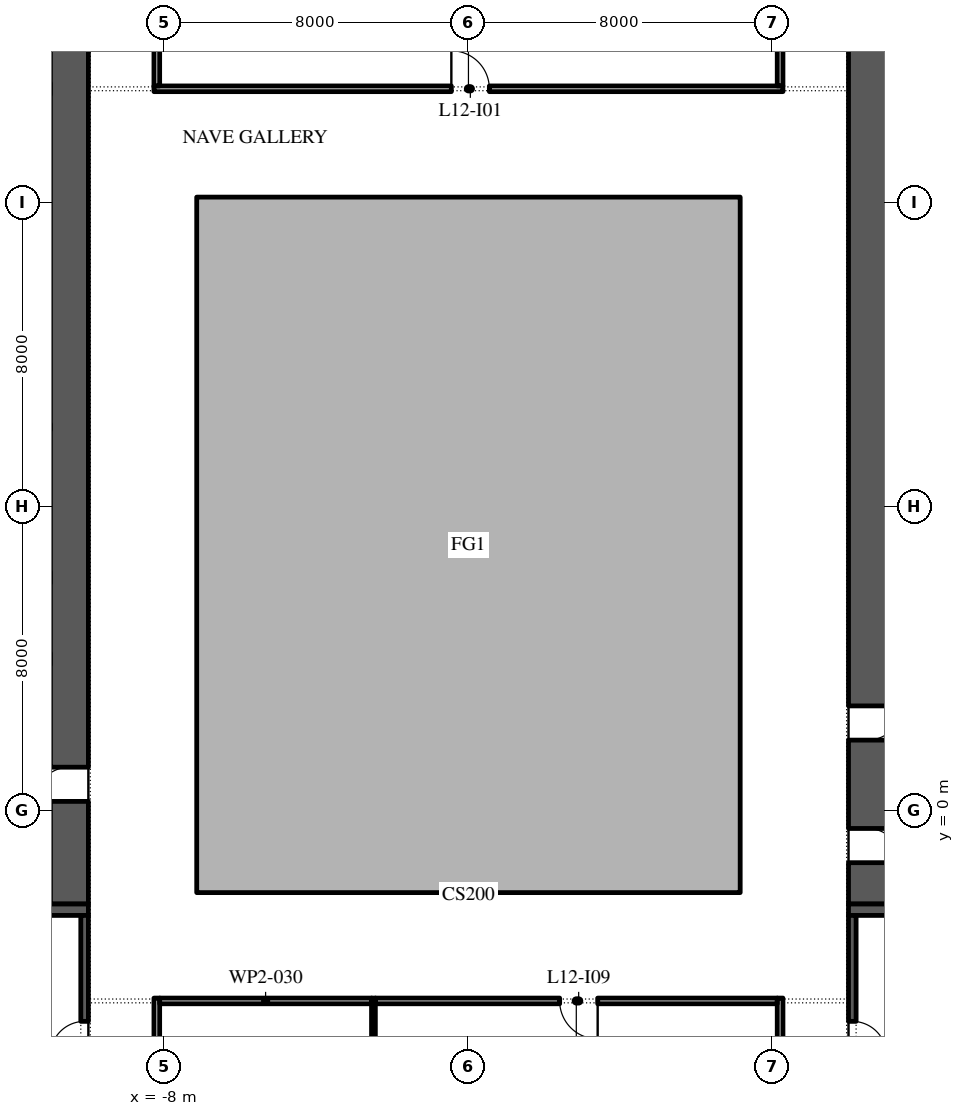
"""IFC4 building model, lengths in metres.
Left out: names, types, materials, properties, quantities, classifications, styles, units other than length and angle.
Written with IfcOpenShell. Run it as: python <this file> out.ifc"""

import sys

from ifc_helpers import new_model, si_unit, direction, frame, frame_2d, origin, place, context, subcontext, project, spatial, polyline, rectangle, outline, extrude, element, fill, save


model = new_model("IFC4")
c1 = context("Model", 3, precision=1e-05, world=origin(), true_north=direction((0.0, 1.0)))
c2 = subcontext(c1, "Body", "Model", "MODEL_VIEW")
j1 = project(units=[si_unit("LENGTHUNIT", "METRE"), si_unit("PLANEANGLEUNIT", "RADIAN")], contexts=[c1])
p1 = place(None, origin())
s1 = spatial("IfcSite", under=j1, at=p1, CompositionType="ELEMENT")
p2 = place(p1, origin())
s2 = spatial("IfcBuilding", under=s1, at=p2, CompositionType="ELEMENT")
p3 = place(p2, frame((0.0, 0.0, 60.6)))
s3 = spatial("IfcBuildingStorey", under=s2, at=p3, CompositionType="ELEMENT", Elevation=60.6)
p4 = place(p3, origin())
e1 = element("IfcWall", 1, at=p4, inside=s3, PredefinedType="STANDARD", context=c2, shape_type="SweptSolid", body=[
    extrude(outline(polyline([(-7.15, -2.15), (7.15, -2.15), (7.15, 16.15), (-7.15, 16.15), (-7.15, -2.15)]), holes=[polyline([(-7.0, -2.0), (-7.0, 16.0), (7.0, 16.0), (7.0, -2.0), (-7.0, -2.0)])]), origin(), (0.0, 0.0, 1.0), 4.0),
])
p5 = place(p3, frame((-10.5, -2.45, 0.0), z_axis=(0.0, 0.0, 1.0), x_axis=(0.0, 1.0, 0.0)))
e2 = element("IfcWall", 2, at=p5, inside=s3, PredefinedType="SHEAR", context=c2, shape_type="SweptSolid", body=[
    extrude(rectangle(XDim=27.9, YDim=1.0, at=frame_2d((13.95, 0.0))), origin(), (0.0, 0.0, 1.0), 4.0),
])
p6 = place(p5, frame((23.65, 0.0, 0.0)))
e3 = element("IfcOpeningElement", 3, at=p6, cuts=e2, PredefinedType="OPENING", context=c2, shape_type="SweptSolid", body=[
    extrude(rectangle(XDim=2.4, YDim=2.1, at=frame_2d((1.2, 1.05))), frame((0.0, 0.51, 0.0), z_axis=(0.0, -1.0, 0.0), x_axis=(1.0, 0.0, 0.0)), (0.0, 0.0, 1.0), 1.02),
])
p7 = place(p5, frame((2.7, 0.0, 0.0)))
e4 = element("IfcOpeningElement", 4, at=p7, cuts=e2, PredefinedType="OPENING", context=c2, shape_type="SweptSolid", body=[
    extrude(rectangle(XDim=0.9, YDim=2.1, at=frame_2d((0.45, 1.05))), frame((0.0, 0.51, 0.0), z_axis=(0.0, -1.0, 0.0), x_axis=(1.0, 0.0, 0.0)), (0.0, 0.0, 1.0), 1.02),
])
p8 = place(p3, frame((-22.0, -2.6, 0.0), z_axis=(0.0, 0.0, 1.0), x_axis=(1.0, 0.0, 0.0)))
e5 = element("IfcWall", 5, at=p8, inside=s3, PredefinedType="SHEAR", context=c2, shape_type="SweptSolid", body=[
    extrude(rectangle(XDim=12.0, YDim=0.3, at=frame_2d((6.0, 0.0))), origin(), (0.0, 0.0, 1.0), 4.0),
])
p9 = place(p3, frame((-10.1, -15.8, 0.0), z_axis=(0.0, 0.0, 1.0), x_axis=(0.0, 1.0, 0.0)))
e6 = element("IfcWall", 6, at=p9, inside=s3, PredefinedType="SHEAR", context=c2, shape_type="SweptSolid", body=[
    extrude(rectangle(XDim=13.05, YDim=0.2, at=frame_2d((6.525, 0.0))), origin(), (0.0, 0.0, 1.0), 4.0),
])
p10 = place(p9, frame((1.175, 0.0, 0.0)))
e7 = element("IfcOpeningElement", 7, at=p10, cuts=e6, PredefinedType="OPENING", context=c2, shape_type="SweptSolid", body=[
    extrude(rectangle(XDim=0.9, YDim=2.1, at=frame_2d((0.45, 1.05))), frame((0.0, 0.11, 0.0), z_axis=(0.0, -1.0, 0.0), x_axis=(1.0, 0.0, 0.0)), (0.0, 0.0, 1.0), 0.22),
])
p11 = place(p9, frame((4.413, 0.0, 0.0)))
e8 = element("IfcOpeningElement", 8, at=p11, cuts=e6, PredefinedType="OPENING", context=c2, shape_type="SweptSolid", body=[
    extrude(rectangle(XDim=1.0, YDim=2.1, at=frame_2d((0.5, 1.05))), frame((0.0, 0.11, 0.0), z_axis=(0.0, -1.0, 0.0), x_axis=(1.0, 0.0, 0.0)), (0.0, 0.0, 1.0), 0.22),
])
p12 = place(p9, frame((9.363, 0.0, 0.0)))
e9 = element("IfcOpeningElement", 9, at=p12, cuts=e6, PredefinedType="OPENING", context=c2, shape_type="SweptSolid", body=[
    extrude(rectangle(XDim=0.9, YDim=2.1, at=frame_2d((0.45, 1.05))), frame((0.0, 0.11, 0.0), z_axis=(0.0, -1.0, 0.0), x_axis=(1.0, 0.0, 0.0)), (0.0, 0.0, 1.0), 0.22),
])
p13 = place(p3, frame((10.5, -2.45, 0.0), z_axis=(0.0, 0.0, 1.0), x_axis=(0.0, 1.0, 0.0)))
e10 = element("IfcWall", 10, at=p13, inside=s3, PredefinedType="SHEAR", context=c2, shape_type="SweptSolid", body=[
    extrude(rectangle(XDim=27.9, YDim=1.0, at=frame_2d((13.95, 0.0))), origin(), (0.0, 0.0, 1.0), 4.0),
])
p14 = place(p13, frame((23.65, 0.0, 0.0)))
e11 = element("IfcOpeningElement", 11, at=p14, cuts=e10, PredefinedType="OPENING", context=c2, shape_type="SweptSolid", body=[
    extrude(rectangle(XDim=2.4, YDim=2.1, at=frame_2d((1.2, 1.05))), frame((0.0, 0.51, 0.0), z_axis=(0.0, -1.0, 0.0), x_axis=(1.0, 0.0, 0.0)), (0.0, 0.0, 1.0), 1.02),
])
p15 = place(p13, frame((1.087, 0.0, 0.0)))
e12 = element("IfcOpeningElement", 12, at=p15, cuts=e10, PredefinedType="OPENING", context=c2, shape_type="SweptSolid", body=[
    extrude(rectangle(XDim=0.9, YDim=2.1, at=frame_2d((0.45, 1.05))), frame((0.0, 0.51, 0.0), z_axis=(0.0, -1.0, 0.0), x_axis=(1.0, 0.0, 0.0)), (0.0, 0.0, 1.0), 1.02),
])
p16 = place(p13, frame((4.312, 0.0, 0.0)))
e13 = element("IfcOpeningElement", 13, at=p16, cuts=e10, PredefinedType="OPENING", context=c2, shape_type="SweptSolid", body=[
    extrude(rectangle(XDim=0.9, YDim=2.1, at=frame_2d((0.45, 1.05))), frame((0.0, 0.51, 0.0), z_axis=(0.0, -1.0, 0.0), x_axis=(1.0, 0.0, 0.0)), (0.0, 0.0, 1.0), 1.02),
])
p17 = place(p3, frame((10.0, -2.6, 0.0), z_axis=(0.0, 0.0, 1.0), x_axis=(1.0, 0.0, 0.0)))
e14 = element("IfcWall", 14, at=p17, inside=s3, PredefinedType="SHEAR", context=c2, shape_type="SweptSolid", body=[
    extrude(rectangle(XDim=12.0, YDim=0.3, at=frame_2d((6.0, 0.0))), origin(), (0.0, 0.0, 1.0), 4.0),
])
p18 = place(p3, frame((10.1, -15.8, 0.0), z_axis=(0.0, 0.0, 1.0), x_axis=(0.0, 1.0, 0.0)))
e15 = element("IfcWall", 15, at=p18, inside=s3, PredefinedType="SHEAR", context=c2, shape_type="SweptSolid", body=[
    extrude(rectangle(XDim=13.05, YDim=0.2, at=frame_2d((6.525, 0.0))), origin(), (0.0, 0.0, 1.0), 4.0),
])
p19 = place(p18, frame((2.762, 0.0, 0.0)))
e16 = element("IfcOpeningElement", 16, at=p19, cuts=e15, PredefinedType="OPENING", context=c2, shape_type="SweptSolid", body=[
    extrude(rectangle(XDim=0.9, YDim=2.1, at=frame_2d((0.45, 1.05))), frame((0.0, 0.11, 0.0), z_axis=(0.0, -1.0, 0.0), x_axis=(1.0, 0.0, 0.0)), (0.0, 0.0, 1.0), 0.22),
])
p20 = place(p18, frame((9.363, 0.0, 0.0)))
e17 = element("IfcOpeningElement", 17, at=p20, cuts=e15, PredefinedType="OPENING", context=c2, shape_type="SweptSolid", body=[
    extrude(rectangle(XDim=0.9, YDim=2.1, at=frame_2d((0.45, 1.05))), frame((0.0, 0.11, 0.0), z_axis=(0.0, -1.0, 0.0), x_axis=(1.0, 0.0, 0.0)), (0.0, 0.0, 1.0), 0.22),
])
p21 = place(p3, frame((-8.2, -4.925, 0.0), z_axis=(0.0, 0.0, 1.0), x_axis=(0.0, -1.0, 0.0)))
e18 = element("IfcWall", 18, at=p21, inside=s3, PredefinedType="PARTITIONING", context=c2, shape_type="SweptSolid", body=[
    extrude(rectangle(XDim=12.415, YDim=0.15, at=frame_2d((6.208, 0.0))), origin(), (0.0, 0.0, 1.0), 4.0),
])
p22 = place(p21, frame((5.715, 0.0, 0.0)))
e19 = element("IfcOpeningElement", 19, at=p22, cuts=e18, PredefinedType="OPENING", context=c2, shape_type="SweptSolid", body=[
    extrude(rectangle(XDim=1.0, YDim=2.1, at=frame_2d((0.5, 1.05))), frame((0.0, 0.085, 0.0), z_axis=(0.0, -1.0, 0.0), x_axis=(1.0, 0.0, 0.0)), (0.0, 0.0, 1.0), 0.17),
])
p23 = place(p3, frame((-8.275, 19.0, 0.0), z_axis=(0.0, 0.0, 1.0), x_axis=(1.0, 0.0, 0.0)))
e20 = element("IfcWall", 20, at=p23, inside=s3, PredefinedType="PARTITIONING", context=c2, shape_type="SweptSolid", body=[
    extrude(rectangle(XDim=16.55, YDim=0.15, at=frame_2d((8.275, 0.0))), origin(), (0.0, 0.0, 1.0), 4.0),
])
p24 = place(p23, frame((7.825, 0.0, 0.0)))
e21 = element("IfcOpeningElement", 21, at=p24, cuts=e20, PredefinedType="OPENING", context=c2, shape_type="SweptSolid", body=[
    extrude(rectangle(XDim=1.0, YDim=2.1, at=frame_2d((0.5, 1.05))), frame((0.0, 0.085, 0.0), z_axis=(0.0, -1.0, 0.0), x_axis=(1.0, 0.0, 0.0)), (0.0, 0.0, 1.0), 0.17),
])
p25 = place(p3, frame((-8.2, 25.45, 0.0), z_axis=(0.0, 0.0, 1.0), x_axis=(0.0, -1.0, 0.0)))
e22 = element("IfcWall", 22, at=p25, inside=s3, PredefinedType="PARTITIONING", context=c2, shape_type="SweptSolid", body=[
    extrude(rectangle(XDim=6.375, YDim=0.15, at=frame_2d((3.188, 0.0))), origin(), (0.0, 0.0, 1.0), 4.0),
])
p26 = place(p3, frame((-2.5, -8.45, 0.0), z_axis=(0.0, 0.0, 1.0), x_axis=(0.0, 1.0, 0.0)))
e23 = element("IfcWall", 23, at=p26, inside=s3, PredefinedType="PARTITIONING", context=c2, shape_type="SweptSolid", body=[
    extrude(rectangle(XDim=3.525, YDim=0.1, at=frame_2d((1.762, 0.0))), origin(), (0.0, 0.0, 1.0), 4.0),
])
p27 = place(p3, frame((-2.55, -5.0, 0.0), z_axis=(0.0, 0.0, 1.0), x_axis=(-1.0, 0.0, 0.0)))
e24 = element("IfcWall", 24, at=p27, inside=s3, PredefinedType="PARTITIONING", context=c2, shape_type="SweptSolid", body=[
    extrude(rectangle(XDim=5.575, YDim=0.15, at=frame_2d((2.788, 0.0))), origin(), (0.0, 0.0, 1.0), 4.0),
])
p28 = place(p3, frame((8.2, -8.45, 0.0), z_axis=(0.0, 0.0, 1.0), x_axis=(0.0, 1.0, 0.0)))
e25 = element("IfcWall", 25, at=p28, inside=s3, PredefinedType="PARTITIONING", context=c2, shape_type="SweptSolid", body=[
    extrude(rectangle(XDim=3.525, YDim=0.15, at=frame_2d((1.762, 0.0))), origin(), (0.0, 0.0, 1.0), 4.0),
])
p29 = place(p3, frame((8.125, -5.0, 0.0), z_axis=(0.0, 0.0, 1.0), x_axis=(-1.0, 0.0, 0.0)))
e26 = element("IfcWall", 26, at=p29, inside=s3, PredefinedType="PARTITIONING", context=c2, shape_type="SweptSolid", body=[
    extrude(rectangle(XDim=10.575, YDim=0.15, at=frame_2d((5.288, 0.0))), origin(), (0.0, 0.0, 1.0), 4.0),
])
p30 = place(p29, frame((4.725, 0.0, 0.0)))
e27 = element("IfcOpeningElement", 27, at=p30, cuts=e26, PredefinedType="OPENING", context=c2, shape_type="SweptSolid", body=[
    extrude(rectangle(XDim=1.0, YDim=2.1, at=frame_2d((0.5, 1.05))), frame((0.0, 0.085, 0.0), z_axis=(0.0, -1.0, 0.0), x_axis=(1.0, 0.0, 0.0)), (0.0, 0.0, 1.0), 0.17),
])
p31 = place(p3, frame((8.2, 19.075, 0.0), z_axis=(0.0, 0.0, 1.0), x_axis=(0.0, 1.0, 0.0)))
e28 = element("IfcWall", 28, at=p31, inside=s3, PredefinedType="PARTITIONING", context=c2, shape_type="SweptSolid", body=[
    extrude(rectangle(XDim=6.275, YDim=0.15, at=frame_2d((3.138, 0.0))), origin(), (0.0, 0.0, 1.0), 4.0),
])
p32 = place(p12, origin())
e29 = element("IfcDoor", 29, at=p32, inside=s3, OperationType="SINGLE_SWING_RIGHT", PredefinedType="DOOR", context=c2, shape_type="SweptSolid", body=[
    extrude(rectangle(XDim=0.9, YDim=2.1, at=frame_2d((0.45, 1.05))), frame((0.0, 0.1, 0.0), z_axis=(0.0, -1.0, 0.0), x_axis=(1.0, 0.0, 0.0)), (0.0, 0.0, 1.0), 0.05),
])
fill(e9, e29)
p33 = place(p20, frame((0.9, -0.15, 0.0), z_axis=(0.0, 0.0, 1.0), x_axis=(-1.0, 0.0, 0.0)))
e30 = element("IfcDoor", 30, at=p33, inside=s3, OperationType="SINGLE_SWING_LEFT", PredefinedType="DOOR", context=c2, shape_type="SweptSolid", body=[
    extrude(rectangle(XDim=0.9, YDim=2.1, at=frame_2d((0.45, 1.05))), frame((0.0, -0.05, 0.0), z_axis=(0.0, -1.0, 0.0), x_axis=(1.0, 0.0, 0.0)), (0.0, 0.0, 1.0), 0.05),
])
fill(e17, e30)
p34 = place(p24, origin())
e31 = element("IfcDoor", 31, at=p34, inside=s3, OperationType="SINGLE_SWING_RIGHT", PredefinedType="DOOR", context=c2, shape_type="SweptSolid", body=[
    extrude(rectangle(XDim=1.0, YDim=2.1, at=frame_2d((0.5, 1.05))), frame((0.0, 0.025, 0.0), z_axis=(0.0, -1.0, 0.0), x_axis=(1.0, 0.0, 0.0)), (0.0, 0.0, 1.0), 0.05),
])
fill(e21, e31)
p35 = place(p30, origin())
e32 = element("IfcDoor", 32, at=p35, inside=s3, OperationType="SINGLE_SWING_RIGHT", PredefinedType="DOOR", context=c2, shape_type="SweptSolid", body=[
    extrude(rectangle(XDim=1.0, YDim=2.1, at=frame_2d((0.5, 1.05))), frame((0.0, 0.025, 0.0), z_axis=(0.0, -1.0, 0.0), x_axis=(1.0, 0.0, 0.0)), (0.0, 0.0, 1.0), 0.05),
])
fill(e27, e32)
save(model, sys.argv[1])
